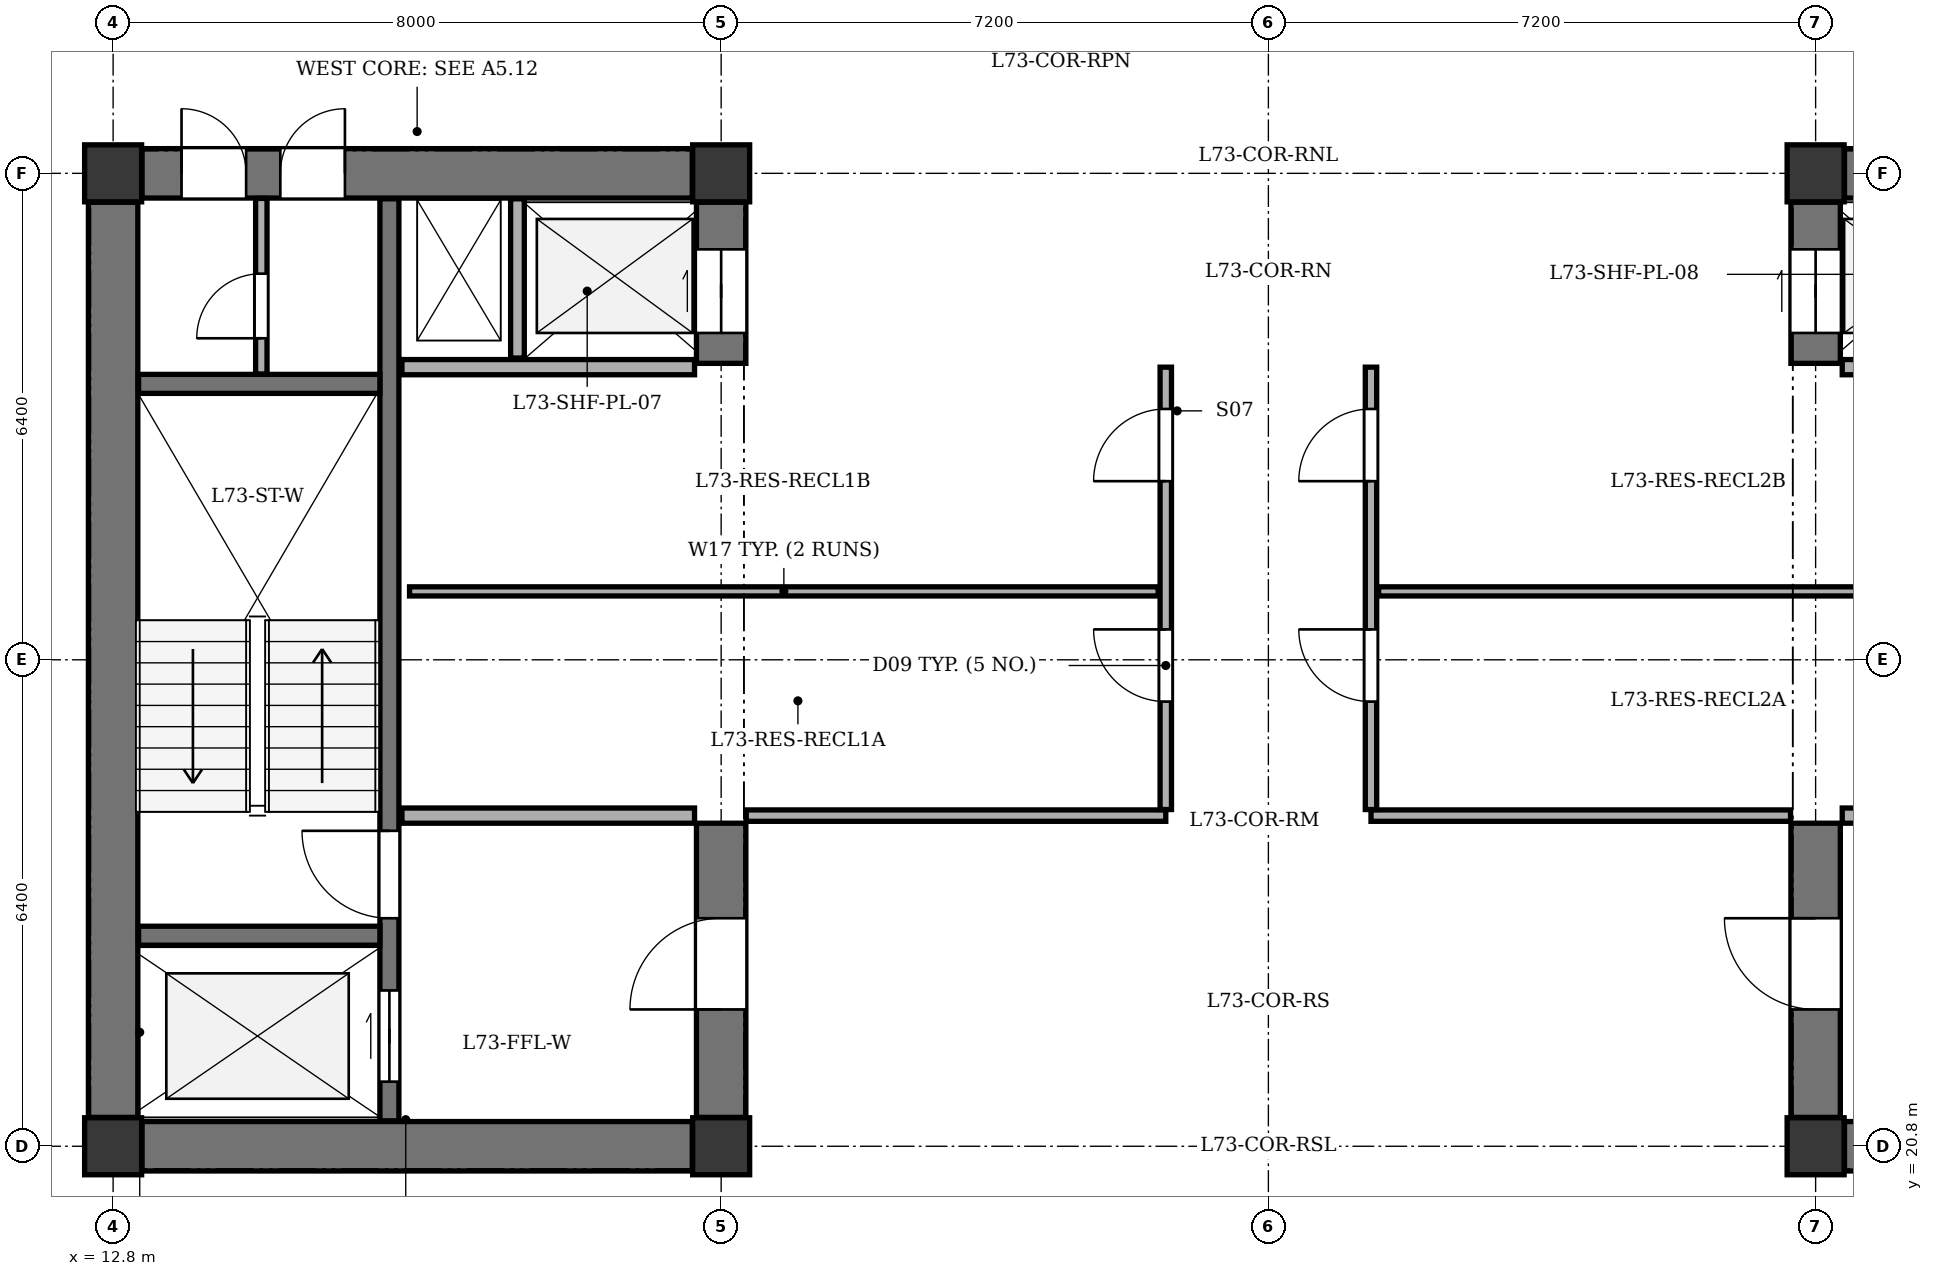
"""IFC4 building model, lengths in metres.
Left out: names, types, materials, properties, quantities, classifications, styles, units other than length and angle.
Written with IfcOpenShell. Run it as: python <this file> out.ifc"""

import sys

from ifc_helpers import new_model, si_unit, direction, frame, frame_2d, origin, origin_2d, place, context, subcontext, project, spatial, rectangle, extrude, element, fill, save


model = new_model("IFC4")
c1 = context("Model", 3, precision=1e-05, world=origin(), true_north=direction((0.0, 1.0)))
c2 = subcontext(c1, "Body", "Model", "MODEL_VIEW")
j1 = project(units=[si_unit("LENGTHUNIT", "METRE"), si_unit("PLANEANGLEUNIT", "RADIAN")], contexts=[c1])
p1 = place(None, origin())
s1 = spatial("IfcSite", under=j1, at=p1, CompositionType="ELEMENT")
p2 = place(p1, origin())
s2 = spatial("IfcBuilding", under=s1, at=p2, CompositionType="ELEMENT")
p3 = place(p2, frame((0.0, 0.0, 275.5)))
s3 = spatial("IfcBuildingStorey", under=s2, at=p3, CompositionType="ELEMENT", Elevation=275.5)
for number, where, z_axis, x_axis in (
    (1, (12.8, 20.8, 0.0), (0.0, 0.0, 1.0), (1.0, 0.0, 0.0)),
    (2, (20.8, 20.8, 0.0), (0.0, 0.0, 1.0), (1.0, 0.0, 0.0)),
    (3, (12.8, 33.6, 0.0), (0.0, 0.0, 1.0), (1.0, 0.0, 0.0)),
    (4, (20.8, 33.6, 0.0), (0.0, 0.0, 1.0), (1.0, 0.0, 0.0)),
    (5, (35.2, 20.8, 0.0), (0.0, 0.0, 1.0), (1.0, 0.0, 0.0)),
    (6, (35.2, 33.6, 0.0), (0.0, 0.0, 1.0), (1.0, 0.0, 0.0)),
):
    element("IfcColumn", number, at=place(p3, frame(where, z_axis=z_axis, x_axis=x_axis)), inside=s3, PredefinedType="COLUMN", context=c2, shape_type="SweptSolid", body=[
        extrude(rectangle(XDim=0.75, YDim=0.75, at=origin_2d()), origin(), (0.0, 0.0, 1.0), 3.4),
    ])
p4 = place(p3, frame((12.8, 21.18, 0.0), z_axis=(0.0, 0.0, 1.0), x_axis=(0.0, 1.0, 0.0)))
e7 = element("IfcWall", 7, at=p4, inside=s3, PredefinedType="SHEAR", context=c2, shape_type="SweptSolid", body=[
    extrude(rectangle(XDim=12.04, YDim=0.65, at=frame_2d((6.02, 0.0))), origin(), (0.0, 0.0, 1.0), 3.1),
])
p5 = place(p3, frame((13.18, 20.8, 0.0), z_axis=(0.0, 0.0, 1.0), x_axis=(1.0, 0.0, 0.0)))
e8 = element("IfcWall", 8, at=p5, inside=s3, PredefinedType="SHEAR", context=c2, shape_type="SweptSolid", body=[
    extrude(rectangle(XDim=7.24, YDim=0.65, at=frame_2d((3.62, 0.0))), origin(), (0.0, 0.0, 1.0), 3.1),
])
p6 = place(p3, frame((13.18, 33.6, 0.0), z_axis=(0.0, 0.0, 1.0), x_axis=(1.0, 0.0, 0.0)))
e9 = element("IfcWall", 9, at=p6, inside=s3, PredefinedType="SHEAR", context=c2, shape_type="SweptSolid", body=[
    extrude(rectangle(XDim=7.24, YDim=0.65, at=frame_2d((3.62, 0.0))), origin(), (0.0, 0.0, 1.0), 3.1),
])
p7 = place(p6, frame((0.52, 0.0, 0.0)))
e10 = element("IfcOpeningElement", 10, at=p7, cuts=e9, PredefinedType="OPENING", context=c2, shape_type="SweptSolid", body=[
    extrude(rectangle(XDim=0.85, YDim=2.02, at=frame_2d((0.425, 1.01))), frame((0.0, 0.335, 0.0), z_axis=(0.0, -1.0, 0.0), x_axis=(1.0, 0.0, 0.0)), (0.0, 0.0, 1.0), 0.67),
])
p8 = place(p6, frame((1.82, 0.0, 0.0)))
e11 = element("IfcOpeningElement", 11, at=p8, cuts=e9, PredefinedType="OPENING", context=c2, shape_type="SweptSolid", body=[
    extrude(rectangle(XDim=0.85, YDim=2.02, at=frame_2d((0.425, 1.01))), frame((0.0, 0.335, 0.0), z_axis=(0.0, -1.0, 0.0), x_axis=(1.0, 0.0, 0.0)), (0.0, 0.0, 1.0), 0.67),
])
p9 = place(p3, frame((20.8, 21.18, 0.0), z_axis=(0.0, 0.0, 1.0), x_axis=(0.0, 1.0, 0.0)))
e12 = element("IfcWall", 12, at=p9, inside=s3, PredefinedType="SHEAR", context=c2, shape_type="SweptSolid", body=[
    extrude(rectangle(XDim=3.87, YDim=0.65, at=frame_2d((1.935, 0.0))), origin(), (0.0, 0.0, 1.0), 3.1),
])
p10 = place(p9, frame((1.42, 0.0, 0.0)))
e13 = element("IfcOpeningElement", 13, at=p10, cuts=e12, PredefinedType="OPENING", context=c2, shape_type="SweptSolid", body=[
    extrude(rectangle(XDim=1.2, YDim=2.15, at=frame_2d((0.6, 1.075))), frame((0.0, 0.335, 0.0), z_axis=(0.0, -1.0, 0.0), x_axis=(1.0, 0.0, 0.0)), (0.0, 0.0, 1.0), 0.67),
])
p11 = place(p3, frame((20.8, 31.1, 0.0), z_axis=(0.0, 0.0, 1.0), x_axis=(0.0, 1.0, 0.0)))
e14 = element("IfcWall", 14, at=p11, inside=s3, PredefinedType="SHEAR", context=c2, shape_type="SweptSolid", body=[
    extrude(rectangle(XDim=2.12, YDim=0.65, at=frame_2d((1.06, 0.0))), origin(), (0.0, 0.0, 1.0), 3.1),
])
p12 = place(p11, frame((0.4, 0.0, 0.0)))
e15 = element("IfcOpeningElement", 15, at=p12, cuts=e14, PredefinedType="OPENING", context=c2, shape_type="SweptSolid", body=[
    extrude(rectangle(XDim=1.1, YDim=2.1, at=frame_2d((0.55, 1.05))), frame((0.0, 0.335, 0.0), z_axis=(0.0, -1.0, 0.0), x_axis=(1.0, 0.0, 0.0)), (0.0, 0.0, 1.0), 0.67),
])
p13 = place(p3, frame((16.435, 21.135, 0.0), z_axis=(0.0, 0.0, 1.0), x_axis=(0.0, 1.0, 0.0)))
e16 = element("IfcWall", 16, at=p13, inside=s3, PredefinedType="SHEAR", context=c2, shape_type="SweptSolid", body=[
    extrude(rectangle(XDim=12.13, YDim=0.25, at=frame_2d((6.065, 0.0))), origin(), (0.0, 0.0, 1.0), 3.1),
])
p14 = place(p13, frame((0.515, 0.0, 0.0)))
e17 = element("IfcOpeningElement", 17, at=p14, cuts=e16, PredefinedType="OPENING", context=c2, shape_type="SweptSolid", body=[
    extrude(rectangle(XDim=1.2, YDim=2.15, at=frame_2d((0.6, 1.075))), frame((0.0, 0.135, 0.0), z_axis=(0.0, -1.0, 0.0), x_axis=(1.0, 0.0, 0.0)), (0.0, 0.0, 1.0), 0.27),
])
p15 = place(p13, frame((2.665, 0.0, 0.0)))
e18 = element("IfcOpeningElement", 18, at=p15, cuts=e16, PredefinedType="OPENING", context=c2, shape_type="SweptSolid", body=[
    extrude(rectangle(XDim=1.15, YDim=2.15, at=frame_2d((0.575, 1.075))), frame((0.0, 0.135, 0.0), z_axis=(0.0, -1.0, 0.0), x_axis=(1.0, 0.0, 0.0)), (0.0, 0.0, 1.0), 0.27),
])
for number, where, z_axis, x_axis in (
    (19, (13.135, 23.57, 0.0), (0.0, 0.0, 1.0), (1.0, 0.0, 0.0)),
    (20, (13.135, 30.83, 0.0), (0.0, 0.0, 1.0), (1.0, 0.0, 0.0)),
):
    element("IfcWall", number, at=place(p3, frame(where, z_axis=z_axis, x_axis=x_axis)), inside=s3, PredefinedType="SHEAR", context=c2, shape_type="SweptSolid", body=[
        extrude(rectangle(XDim=3.175, YDim=0.25, at=frame_2d((1.587, 0.0))), origin(), (0.0, 0.0, 1.0), 3.1),
    ])
for number, where, z_axis, x_axis in (
    (21, (16.6, 25.15, 0.0), (0.0, 0.0, 1.0), (1.0, 0.0, 0.0)),
    (22, (16.6, 31.05, 0.0), (0.0, 0.0, 1.0), (1.0, 0.0, 0.0)),
):
    element("IfcWall", number, at=place(p3, frame(where, z_axis=z_axis, x_axis=x_axis)), inside=s3, PredefinedType="SOLIDWALL", context=c2, shape_type="SweptSolid", body=[
        extrude(rectangle(XDim=3.85, YDim=0.2, at=frame_2d((1.925, 0.0))), origin(), (0.0, 0.0, 1.0), 3.1),
    ])
p16 = place(p3, frame((18.12, 31.17, 0.0), z_axis=(0.0, 0.0, 1.0), x_axis=(0.0, 1.0, 0.0)))
e23 = element("IfcWall", 23, at=p16, inside=s3, PredefinedType="PARTITIONING", context=c2, shape_type="SweptSolid", body=[
    extrude(rectangle(XDim=2.095, YDim=0.18, at=frame_2d((1.047, 0.0))), origin(), (0.0, 0.0, 1.0), 3.1),
])
p17 = place(p3, frame((35.58, 20.8, 0.0), z_axis=(0.0, 0.0, 1.0), x_axis=(1.0, 0.0, 0.0)))
e24 = element("IfcWall", 24, at=p17, inside=s3, PredefinedType="SHEAR", context=c2, shape_type="SweptSolid", body=[
    extrude(rectangle(XDim=7.24, YDim=0.65, at=frame_2d((3.62, 0.0))), origin(), (0.0, 0.0, 1.0), 3.1),
])
p18 = place(p3, frame((35.58, 33.6, 0.0), z_axis=(0.0, 0.0, 1.0), x_axis=(1.0, 0.0, 0.0)))
e25 = element("IfcWall", 25, at=p18, inside=s3, PredefinedType="SHEAR", context=c2, shape_type="SweptSolid", body=[
    extrude(rectangle(XDim=7.24, YDim=0.65, at=frame_2d((3.62, 0.0))), origin(), (0.0, 0.0, 1.0), 3.1),
])
p19 = place(p18, frame((4.82, 0.0, 0.0)))
e26 = element("IfcOpeningElement", 26, at=p19, cuts=e25, PredefinedType="OPENING", context=c2, shape_type="SweptSolid", body=[
    extrude(rectangle(XDim=1.3, YDim=2.15, at=frame_2d((0.65, 1.075))), frame((0.0, 0.335, 0.0), z_axis=(0.0, -1.0, 0.0), x_axis=(1.0, 0.0, 0.0)), (0.0, 0.0, 1.0), 0.67),
])
p20 = place(p18, frame((2.62, 0.0, 0.0)))
e27 = element("IfcOpeningElement", 27, at=p20, cuts=e25, PredefinedType="OPENING", context=c2, shape_type="SweptSolid", body=[
    extrude(rectangle(XDim=0.85, YDim=2.02, at=frame_2d((0.425, 1.01))), frame((0.0, 0.335, 0.0), z_axis=(0.0, -1.0, 0.0), x_axis=(1.0, 0.0, 0.0)), (0.0, 0.0, 1.0), 0.67),
])
p21 = place(p3, frame((35.2, 21.18, 0.0), z_axis=(0.0, 0.0, 1.0), x_axis=(0.0, 1.0, 0.0)))
e28 = element("IfcWall", 28, at=p21, inside=s3, PredefinedType="SHEAR", context=c2, shape_type="SweptSolid", body=[
    extrude(rectangle(XDim=3.87, YDim=0.65, at=frame_2d((1.935, 0.0))), origin(), (0.0, 0.0, 1.0), 3.1),
])
p22 = place(p21, frame((1.42, 0.0, 0.0)))
e29 = element("IfcOpeningElement", 29, at=p22, cuts=e28, PredefinedType="OPENING", context=c2, shape_type="SweptSolid", body=[
    extrude(rectangle(XDim=1.2, YDim=2.15, at=frame_2d((0.6, 1.075))), frame((0.0, 0.335, 0.0), z_axis=(0.0, -1.0, 0.0), x_axis=(1.0, 0.0, 0.0)), (0.0, 0.0, 1.0), 0.67),
])
p23 = place(p3, frame((35.2, 31.1, 0.0), z_axis=(0.0, 0.0, 1.0), x_axis=(0.0, 1.0, 0.0)))
e30 = element("IfcWall", 30, at=p23, inside=s3, PredefinedType="SHEAR", context=c2, shape_type="SweptSolid", body=[
    extrude(rectangle(XDim=2.12, YDim=0.65, at=frame_2d((1.06, 0.0))), origin(), (0.0, 0.0, 1.0), 3.1),
])
p24 = place(p23, frame((0.4, 0.0, 0.0)))
e31 = element("IfcOpeningElement", 31, at=p24, cuts=e30, PredefinedType="OPENING", context=c2, shape_type="SweptSolid", body=[
    extrude(rectangle(XDim=1.1, YDim=2.1, at=frame_2d((0.55, 1.05))), frame((0.0, 0.335, 0.0), z_axis=(0.0, -1.0, 0.0), x_axis=(1.0, 0.0, 0.0)), (0.0, 0.0, 1.0), 0.67),
])
p25 = place(p3, frame((35.55, 25.15, 0.0), z_axis=(0.0, 0.0, 1.0), x_axis=(1.0, 0.0, 0.0)))
e32 = element("IfcWall", 32, at=p25, inside=s3, PredefinedType="SOLIDWALL", context=c2, shape_type="SweptSolid", body=[
    extrude(rectangle(XDim=3.85, YDim=0.2, at=frame_2d((1.925, 0.0))), origin(), (0.0, 0.0, 1.0), 3.1),
])
p26 = place(p3, frame((35.55, 31.05, 0.0), z_axis=(0.0, 0.0, 1.0), x_axis=(1.0, 0.0, 0.0)))
e33 = element("IfcWall", 33, at=p26, inside=s3, PredefinedType="SOLIDWALL", context=c2, shape_type="SweptSolid", body=[
    extrude(rectangle(XDim=2.25, YDim=0.2, at=frame_2d((1.125, 0.0))), origin(), (0.0, 0.0, 1.0), 3.1),
])
p27 = place(p3, frame((14.75, 30.96, 0.0), z_axis=(0.0, 0.0, 1.0), x_axis=(0.0, 1.0, 0.0)))
e34 = element("IfcWall", 34, at=p27, inside=s3, PredefinedType="PARTITIONING", context=c2, shape_type="SweptSolid", body=[
    extrude(rectangle(XDim=2.31, YDim=0.15, at=frame_2d((1.155, 0.0))), origin(), (0.0, 0.0, 1.0), 3.1),
])
p28 = place(p27, frame((0.47, 0.0, 0.0)))
e35 = element("IfcOpeningElement", 35, at=p28, cuts=e34, PredefinedType="OPENING", context=c2, shape_type="SweptSolid", body=[
    extrude(rectangle(XDim=0.85, YDim=2.02, at=frame_2d((0.425, 1.01))), frame((0.0, 0.085, 0.0), z_axis=(0.0, -1.0, 0.0), x_axis=(1.0, 0.0, 0.0)), (0.0, 0.0, 1.0), 0.17),
])
for number, where, z_axis, x_axis in (
    (36, (21.13, 25.15, 0.0), (0.0, 0.0, 1.0), (1.0, 0.0, 0.0)),
    (37, (29.35, 25.15, 0.0), (0.0, 0.0, 1.0), (1.0, 0.0, 0.0)),
):
    element("IfcWall", number, at=place(p3, frame(where, z_axis=z_axis, x_axis=x_axis)), inside=s3, PredefinedType="PARTITIONING", context=c2, shape_type="SweptSolid", body=[
        extrude(rectangle(XDim=5.52, YDim=0.15, at=frame_2d((2.76, 0.0))), origin(), (0.0, 0.0, 1.0), 3.1),
    ])
p29 = place(p3, frame((26.65, 25.23, 0.0), z_axis=(0.0, 0.0, 1.0), x_axis=(0.0, 1.0, 0.0)))
e38 = element("IfcWall", 38, at=p29, inside=s3, PredefinedType="PARTITIONING", context=c2, shape_type="SweptSolid", body=[
    extrude(rectangle(XDim=5.82, YDim=0.15, at=frame_2d((2.91, 0.0))), origin(), (0.0, 0.0, 1.0), 3.1),
])
p30 = place(p29, frame((1.42, 0.0, 0.0)))
e39 = element("IfcOpeningElement", 39, at=p30, cuts=e38, PredefinedType="OPENING", context=c2, shape_type="SweptSolid", body=[
    extrude(rectangle(XDim=0.95, YDim=2.1, at=frame_2d((0.475, 1.05))), frame((0.0, 0.085, 0.0), z_axis=(0.0, -1.0, 0.0), x_axis=(1.0, 0.0, 0.0)), (0.0, 0.0, 1.0), 0.17),
])
p31 = place(p29, frame((4.32, 0.0, 0.0)))
e40 = element("IfcOpeningElement", 40, at=p31, cuts=e38, PredefinedType="OPENING", context=c2, shape_type="SweptSolid", body=[
    extrude(rectangle(XDim=0.95, YDim=2.1, at=frame_2d((0.475, 1.05))), frame((0.0, 0.085, 0.0), z_axis=(0.0, -1.0, 0.0), x_axis=(1.0, 0.0, 0.0)), (0.0, 0.0, 1.0), 0.17),
])
p32 = place(p3, frame((16.7, 28.1, 0.0), z_axis=(0.0, 0.0, 1.0), x_axis=(1.0, 0.0, 0.0)))
e41 = element("IfcWall", 41, at=p32, inside=s3, PredefinedType="PARTITIONING", context=c2, shape_type="SweptSolid", body=[
    extrude(rectangle(XDim=9.85, YDim=0.12, at=frame_2d((4.925, 0.0))), origin(), (0.0, 0.0, 1.0), 3.1),
])
p33 = place(p3, frame((29.35, 25.23, 0.0), z_axis=(0.0, 0.0, 1.0), x_axis=(0.0, 1.0, 0.0)))
e42 = element("IfcWall", 42, at=p33, inside=s3, PredefinedType="PARTITIONING", context=c2, shape_type="SweptSolid", body=[
    extrude(rectangle(XDim=5.82, YDim=0.15, at=frame_2d((2.91, 0.0))), origin(), (0.0, 0.0, 1.0), 3.1),
])
p34 = place(p33, frame((1.42, 0.0, 0.0)))
e43 = element("IfcOpeningElement", 43, at=p34, cuts=e42, PredefinedType="OPENING", context=c2, shape_type="SweptSolid", body=[
    extrude(rectangle(XDim=0.95, YDim=2.1, at=frame_2d((0.475, 1.05))), frame((0.0, 0.085, 0.0), z_axis=(0.0, -1.0, 0.0), x_axis=(1.0, 0.0, 0.0)), (0.0, 0.0, 1.0), 0.17),
])
p35 = place(p33, frame((4.32, 0.0, 0.0)))
e44 = element("IfcOpeningElement", 44, at=p35, cuts=e42, PredefinedType="OPENING", context=c2, shape_type="SweptSolid", body=[
    extrude(rectangle(XDim=0.95, YDim=2.1, at=frame_2d((0.475, 1.05))), frame((0.0, 0.085, 0.0), z_axis=(0.0, -1.0, 0.0), x_axis=(1.0, 0.0, 0.0)), (0.0, 0.0, 1.0), 0.17),
])
p36 = place(p3, frame((29.45, 28.1, 0.0), z_axis=(0.0, 0.0, 1.0), x_axis=(1.0, 0.0, 0.0)))
e45 = element("IfcWall", 45, at=p36, inside=s3, PredefinedType="PARTITIONING", context=c2, shape_type="SweptSolid", body=[
    extrude(rectangle(XDim=8.345, YDim=0.12, at=frame_2d((4.172, 0.0))), origin(), (0.0, 0.0, 1.0), 3.1),
])
p37 = place(p7, origin())
e46 = element("IfcDoor", 46, at=p37, inside=s3, OperationType="SINGLE_SWING_LEFT", PredefinedType="DOOR", context=c2, shape_type="SweptSolid", body=[
    extrude(rectangle(XDim=0.85, YDim=2.02, at=frame_2d((0.425, 1.01))), frame((0.0, 0.025, 0.0), z_axis=(0.0, -1.0, 0.0), x_axis=(1.0, 0.0, 0.0)), (0.0, 0.0, 1.0), 0.05),
])
fill(e10, e46)
p38 = place(p8, origin())
e47 = element("IfcDoor", 47, at=p38, inside=s3, OperationType="SINGLE_SWING_RIGHT", PredefinedType="DOOR", context=c2, shape_type="SweptSolid", body=[
    extrude(rectangle(XDim=0.85, YDim=2.02, at=frame_2d((0.425, 1.01))), frame((0.0, 0.025, 0.0), z_axis=(0.0, -1.0, 0.0), x_axis=(1.0, 0.0, 0.0)), (0.0, 0.0, 1.0), 0.05),
])
fill(e11, e47)
p39 = place(p10, origin())
e48 = element("IfcDoor", 48, at=p39, inside=s3, OperationType="SINGLE_SWING_LEFT", PredefinedType="DOOR", context=c2, shape_type="SweptSolid", body=[
    extrude(rectangle(XDim=1.2, YDim=2.15, at=frame_2d((0.6, 1.075))), frame((0.0, 0.025, 0.0), z_axis=(0.0, -1.0, 0.0), x_axis=(1.0, 0.0, 0.0)), (0.0, 0.0, 1.0), 0.05),
])
fill(e13, e48)
p40 = place(p12, origin())
e49 = element("IfcDoor", 49, at=p40, inside=s3, OperationType="DOUBLE_DOOR_SLIDING", PredefinedType="DOOR", context=c2, shape_type="SweptSolid", body=[
    extrude(rectangle(XDim=1.1, YDim=2.1, at=frame_2d((0.55, 1.05))), frame((0.0, 0.025, 0.0), z_axis=(0.0, -1.0, 0.0), x_axis=(1.0, 0.0, 0.0)), (0.0, 0.0, 1.0), 0.05),
])
fill(e15, e49)
p41 = place(p14, origin())
e50 = element("IfcDoor", 50, at=p41, inside=s3, OperationType="DOUBLE_DOOR_SLIDING", PredefinedType="DOOR", context=c2, shape_type="SweptSolid", body=[
    extrude(rectangle(XDim=1.2, YDim=2.15, at=frame_2d((0.6, 1.075))), frame((0.0, 0.025, 0.0), z_axis=(0.0, -1.0, 0.0), x_axis=(1.0, 0.0, 0.0)), (0.0, 0.0, 1.0), 0.05),
])
fill(e17, e50)
p42 = place(p15, origin())
e51 = element("IfcDoor", 51, at=p42, inside=s3, OperationType="SINGLE_SWING_RIGHT", PredefinedType="DOOR", context=c2, shape_type="SweptSolid", body=[
    extrude(rectangle(XDim=1.15, YDim=2.15, at=frame_2d((0.575, 1.075))), frame((0.0, 0.025, 0.0), z_axis=(0.0, -1.0, 0.0), x_axis=(1.0, 0.0, 0.0)), (0.0, 0.0, 1.0), 0.05),
])
fill(e18, e51)
p43 = place(p22, origin())
e52 = element("IfcDoor", 52, at=p43, inside=s3, OperationType="SINGLE_SWING_RIGHT", PredefinedType="DOOR", context=c2, shape_type="SweptSolid", body=[
    extrude(rectangle(XDim=1.2, YDim=2.15, at=frame_2d((0.6, 1.075))), frame((0.0, 0.025, 0.0), z_axis=(0.0, -1.0, 0.0), x_axis=(1.0, 0.0, 0.0)), (0.0, 0.0, 1.0), 0.05),
])
fill(e29, e52)
p44 = place(p24, origin())
e53 = element("IfcDoor", 53, at=p44, inside=s3, OperationType="DOUBLE_DOOR_SLIDING", PredefinedType="DOOR", context=c2, shape_type="SweptSolid", body=[
    extrude(rectangle(XDim=1.1, YDim=2.1, at=frame_2d((0.55, 1.05))), frame((0.0, 0.025, 0.0), z_axis=(0.0, -1.0, 0.0), x_axis=(1.0, 0.0, 0.0)), (0.0, 0.0, 1.0), 0.05),
])
fill(e31, e53)
p45 = place(p28, origin())
e54 = element("IfcDoor", 54, at=p45, inside=s3, OperationType="SINGLE_SWING_LEFT", PredefinedType="DOOR", context=c2, shape_type="SweptSolid", body=[
    extrude(rectangle(XDim=0.85, YDim=2.02, at=frame_2d((0.425, 1.01))), frame((0.0, 0.025, 0.0), z_axis=(0.0, -1.0, 0.0), x_axis=(1.0, 0.0, 0.0)), (0.0, 0.0, 1.0), 0.05),
])
fill(e35, e54)
p46 = place(p30, origin())
e55 = element("IfcDoor", 55, at=p46, inside=s3, OperationType="SINGLE_SWING_RIGHT", PredefinedType="DOOR", context=c2, shape_type="SweptSolid", body=[
    extrude(rectangle(XDim=0.95, YDim=2.1, at=frame_2d((0.475, 1.05))), frame((0.0, 0.025, 0.0), z_axis=(0.0, -1.0, 0.0), x_axis=(1.0, 0.0, 0.0)), (0.0, 0.0, 1.0), 0.05),
])
fill(e39, e55)
p47 = place(p31, origin())
e56 = element("IfcDoor", 56, at=p47, inside=s3, OperationType="SINGLE_SWING_LEFT", PredefinedType="DOOR", context=c2, shape_type="SweptSolid", body=[
    extrude(rectangle(XDim=0.95, YDim=2.1, at=frame_2d((0.475, 1.05))), frame((0.0, 0.025, 0.0), z_axis=(0.0, -1.0, 0.0), x_axis=(1.0, 0.0, 0.0)), (0.0, 0.0, 1.0), 0.05),
])
fill(e40, e56)
p48 = place(p34, origin())
e57 = element("IfcDoor", 57, at=p48, inside=s3, OperationType="SINGLE_SWING_RIGHT", PredefinedType="DOOR", context=c2, shape_type="SweptSolid", body=[
    extrude(rectangle(XDim=0.95, YDim=2.1, at=frame_2d((0.475, 1.05))), frame((0.0, 0.025, 0.0), z_axis=(0.0, -1.0, 0.0), x_axis=(1.0, 0.0, 0.0)), (0.0, 0.0, 1.0), 0.05),
])
fill(e43, e57)
p49 = place(p35, origin())
e58 = element("IfcDoor", 58, at=p49, inside=s3, OperationType="SINGLE_SWING_LEFT", PredefinedType="DOOR", context=c2, shape_type="SweptSolid", body=[
    extrude(rectangle(XDim=0.95, YDim=2.1, at=frame_2d((0.475, 1.05))), frame((0.0, 0.025, 0.0), z_axis=(0.0, -1.0, 0.0), x_axis=(1.0, 0.0, 0.0)), (0.0, 0.0, 1.0), 0.05),
])
fill(e44, e58)
save(model, sys.argv[1])
